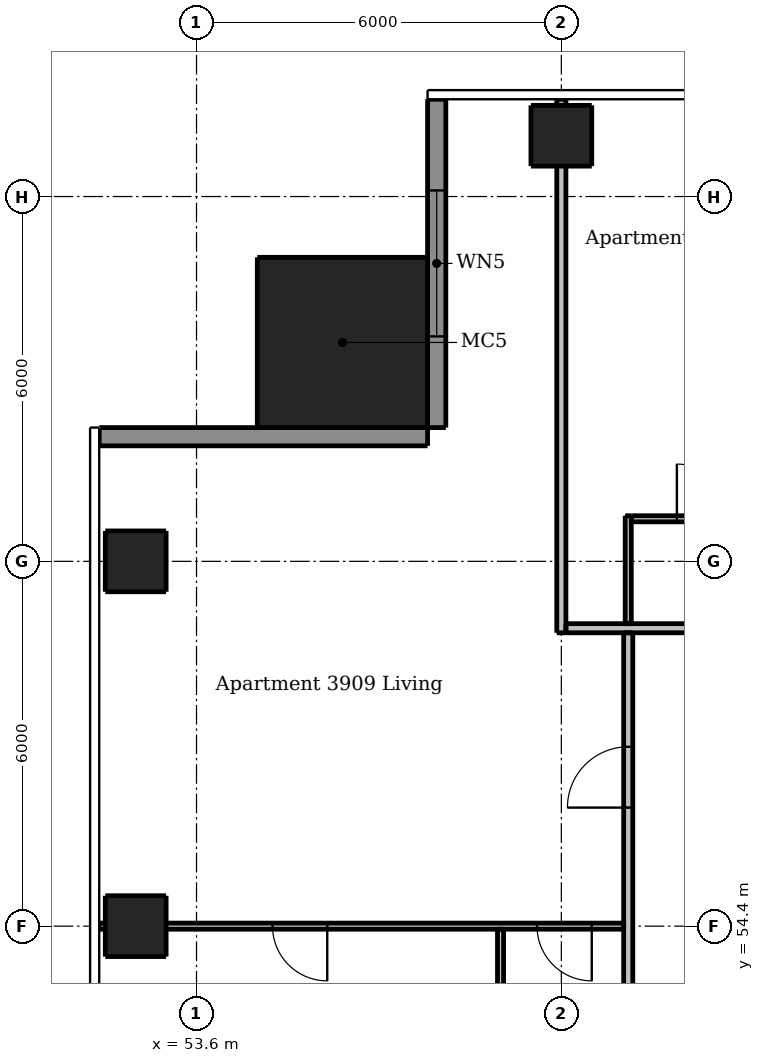
"""IFC4 building model, lengths in metres.
Left out: names, types, materials, properties, quantities, classifications, styles, units other than length and angle.
Written with IfcOpenShell. Run it as: python <this file> out.ifc"""

import sys

from ifc_helpers import new_model, si_unit, direction, frame, frame_2d, origin, origin_2d, place, context, subcontext, project, spatial, rectangle, extrude, element, fill, save


model = new_model("IFC4")
c1 = context("Model", 3, precision=1e-05, world=origin(), true_north=direction((0.0, 1.0)))
c2 = subcontext(c1, "Body", "Model", "MODEL_VIEW")
j1 = project(units=[si_unit("LENGTHUNIT", "METRE"), si_unit("PLANEANGLEUNIT", "RADIAN")], contexts=[c1])
p1 = place(None, origin())
s1 = spatial("IfcSite", under=j1, at=p1, CompositionType="ELEMENT")
p2 = place(p1, origin())
s2 = spatial("IfcBuilding", under=s1, at=p2, CompositionType="ELEMENT")
p3 = place(p2, frame((0.0, 0.0, 147.1)))
s3 = spatial("IfcBuildingStorey", under=s2, at=p3, CompositionType="ELEMENT", Elevation=147.1)
for number, where, z_axis, x_axis in (
    (1, (59.6, 67.4, 0.0), (0.0, 0.0, 1.0), (1.0, 0.0, 0.0)),
    (2, (52.6, 54.4, 0.0), (0.0, 0.0, 1.0), (1.0, 0.0, 0.0)),
    (3, (52.6, 60.4, 0.0), (0.0, 0.0, 1.0), (1.0, 0.0, 0.0)),
):
    element("IfcColumn", number, at=place(p3, frame(where, z_axis=z_axis, x_axis=x_axis)), inside=s3, PredefinedType="COLUMN", context=c2, shape_type="SweptSolid", body=[
        extrude(rectangle(XDim=1.0, YDim=1.0, at=origin_2d()), origin(), (0.0, 0.0, 1.0), 3.0),
    ])
p4 = place(p3, frame((56.0, 64.0, 0.0), z_axis=(0.0, 0.0, 1.0), x_axis=(1.0, 0.0, 0.0)))
e4 = element("IfcColumn", 4, at=p4, inside=s3, PredefinedType="COLUMN", context=c2, shape_type="SweptSolid", body=[
    extrude(rectangle(XDim=2.8, YDim=2.8, at=origin_2d()), origin(), (0.0, 0.0, 1.0), 3.3),
])
p5 = place(p3, frame((57.55, 68.0, 0.0), z_axis=(0.0, 0.0, 1.0), x_axis=(0.0, -1.0, 0.0)))
e5 = element("IfcWall", 5, at=p5, inside=s3, PredefinedType="SOLIDWALL", context=c2, shape_type="SweptSolid", body=[
    extrude(rectangle(XDim=5.4, YDim=0.3, at=frame_2d((2.7, 0.0))), origin(), (0.0, 0.0, 1.0), 3.0),
])
p6 = place(p5, frame((1.5, 0.0, 0.15)))
e6 = element("IfcOpeningElement", 6, at=p6, cuts=e5, PredefinedType="OPENING", context=c2, shape_type="SweptSolid", body=[
    extrude(rectangle(XDim=2.4, YDim=2.1, at=frame_2d((1.2, 1.05))), frame((0.0, 0.16, 0.0), z_axis=(0.0, -1.0, 0.0), x_axis=(1.0, 0.0, 0.0)), (0.0, 0.0, 1.0), 0.32),
])
p7 = place(p3, frame((57.4, 62.45, 0.0), z_axis=(0.0, 0.0, 1.0), x_axis=(-1.0, 0.0, 0.0)))
e7 = element("IfcWall", 7, at=p7, inside=s3, PredefinedType="SOLIDWALL", context=c2, shape_type="SweptSolid", body=[
    extrude(rectangle(XDim=5.4, YDim=0.3, at=frame_2d((2.7, 0.0))), origin(), (0.0, 0.0, 1.0), 3.0),
])
p8 = place(p3, frame((58.6, 54.35, 0.0), z_axis=(0.0, 0.0, 1.0), x_axis=(0.0, -1.0, 0.0)))
e8 = element("IfcWall", 8, at=p8, inside=s3, PredefinedType="PARTITIONING", context=c2, shape_type="SweptSolid", body=[
    extrude(rectangle(XDim=5.875, YDim=0.1, at=frame_2d((2.938, 0.0))), origin(), (0.0, 0.0, 1.0), 3.0),
])
p9 = place(p8, frame((3.75, 0.0, 0.0)))
e9 = element("IfcOpeningElement", 9, at=p9, cuts=e8, PredefinedType="OPENING", context=c2, shape_type="SweptSolid", body=[
    extrude(rectangle(XDim=0.8, YDim=2.1, at=frame_2d((0.4, 1.05))), frame((0.0, 0.06, 0.0), z_axis=(0.0, -1.0, 0.0), x_axis=(1.0, 0.0, 0.0)), (0.0, 0.0, 1.0), 0.12),
])
p10 = place(p3, frame((60.7, 59.375, 0.0), z_axis=(0.0, 0.0, 1.0), x_axis=(0.0, 1.0, 0.0)))
e10 = element("IfcWall", 10, at=p10, inside=s3, PredefinedType="PARTITIONING", context=c2, shape_type="SweptSolid", body=[
    extrude(rectangle(XDim=1.775, YDim=0.1, at=frame_2d((0.887, 0.0))), origin(), (0.0, 0.0, 1.0), 3.0),
])
p11 = place(p3, frame((60.75, 61.1, 0.0), z_axis=(0.0, 0.0, 1.0), x_axis=(1.0, 0.0, 0.0)))
e11 = element("IfcWall", 11, at=p11, inside=s3, PredefinedType="PARTITIONING", context=c2, shape_type="SweptSolid", body=[
    extrude(rectangle(XDim=16.775, YDim=0.1, at=frame_2d((8.387, 0.0))), origin(), (0.0, 0.0, 1.0), 3.0),
])
p12 = place(p11, frame((9.8, 0.0, 0.0)))
e12 = element("IfcOpeningElement", 12, at=p12, cuts=e11, PredefinedType="OPENING", context=c2, shape_type="SweptSolid", body=[
    extrude(rectangle(XDim=0.9, YDim=2.1, at=frame_2d((0.45, 1.05))), frame((0.0, 0.06, 0.0), z_axis=(0.0, -1.0, 0.0), x_axis=(1.0, 0.0, 0.0)), (0.0, 0.0, 1.0), 0.12),
])
p13 = place(p11, frame((14.9, 0.0, 0.0)))
e13 = element("IfcOpeningElement", 13, at=p13, cuts=e11, PredefinedType="OPENING", context=c2, shape_type="SweptSolid", body=[
    extrude(rectangle(XDim=0.9, YDim=2.1, at=frame_2d((0.45, 1.05))), frame((0.0, 0.06, 0.0), z_axis=(0.0, -1.0, 0.0), x_axis=(1.0, 0.0, 0.0)), (0.0, 0.0, 1.0), 0.12),
])
p14 = place(p11, frame((5.3, 0.0, 0.0)))
e14 = element("IfcOpeningElement", 14, at=p14, cuts=e11, PredefinedType="OPENING", context=c2, shape_type="SweptSolid", body=[
    extrude(rectangle(XDim=0.9, YDim=2.1, at=frame_2d((0.45, 1.05))), frame((0.0, 0.06, 0.0), z_axis=(0.0, -1.0, 0.0), x_axis=(1.0, 0.0, 0.0)), (0.0, 0.0, 1.0), 0.12),
])
p15 = place(p11, frame((0.75, 0.0, 0.0)))
e15 = element("IfcOpeningElement", 15, at=p15, cuts=e11, PredefinedType="OPENING", context=c2, shape_type="SweptSolid", body=[
    extrude(rectangle(XDim=0.9, YDim=2.1, at=frame_2d((0.45, 1.05))), frame((0.0, 0.06, 0.0), z_axis=(0.0, -1.0, 0.0), x_axis=(1.0, 0.0, 0.0)), (0.0, 0.0, 1.0), 0.12),
])
p16 = place(p11, frame((3.25, 0.0, 0.0)))
e16 = element("IfcOpeningElement", 16, at=p16, cuts=e11, PredefinedType="OPENING", context=c2, shape_type="SweptSolid", body=[
    extrude(rectangle(XDim=0.8, YDim=2.1, at=frame_2d((0.4, 1.05))), frame((0.0, 0.06, 0.0), z_axis=(0.0, -1.0, 0.0), x_axis=(1.0, 0.0, 0.0)), (0.0, 0.0, 1.0), 0.12),
])
p17 = place(p3, frame((60.625, 54.4, 0.0), z_axis=(0.0, 0.0, 1.0), x_axis=(-1.0, 0.0, 0.0)))
e17 = element("IfcWall", 17, at=p17, inside=s3, PredefinedType="PARTITIONING", context=c2, shape_type="SweptSolid", body=[
    extrude(rectangle(XDim=8.625, YDim=0.1, at=frame_2d((4.312, 0.0))), origin(), (0.0, 0.0, 1.0), 2.466),
])
p18 = place(p17, frame((0.525, 0.0, 0.0)))
e18 = element("IfcOpeningElement", 18, at=p18, cuts=e17, PredefinedType="OPENING", context=c2, shape_type="SweptSolid", body=[
    extrude(rectangle(XDim=0.9, YDim=2.1, at=frame_2d((0.45, 1.05))), frame((0.0, 0.06, 0.0), z_axis=(0.0, -1.0, 0.0), x_axis=(1.0, 0.0, 0.0)), (0.0, 0.0, 1.0), 0.12),
])
p19 = place(p17, frame((4.875, 0.0, 0.0)))
e19 = element("IfcOpeningElement", 19, at=p19, cuts=e17, PredefinedType="OPENING", context=c2, shape_type="SweptSolid", body=[
    extrude(rectangle(XDim=0.9, YDim=2.1, at=frame_2d((0.45, 1.05))), frame((0.0, 0.06, 0.0), z_axis=(0.0, -1.0, 0.0), x_axis=(1.0, 0.0, 0.0)), (0.0, 0.0, 1.0), 0.12),
])
p20 = place(p3, frame((59.6, 59.225, 0.0), z_axis=(0.0, 0.0, 1.0), x_axis=(0.0, 1.0, 0.0)))
e20 = element("IfcWall", 20, at=p20, inside=s3, PredefinedType="PARTITIONING", context=c2, shape_type="SweptSolid", body=[
    extrude(rectangle(XDim=8.775, YDim=0.15, at=frame_2d((4.387, 0.0))), origin(), (0.0, 0.0, 1.0), 2.46),
])
p21 = place(p3, frame((60.7, 30.325, 0.0), z_axis=(0.0, 0.0, 1.0), x_axis=(0.0, 1.0, 0.0)))
e21 = element("IfcWall", 21, at=p21, inside=s3, PredefinedType="PARTITIONING", context=c2, shape_type="SweptSolid", body=[
    extrude(rectangle(XDim=28.9, YDim=0.15, at=frame_2d((14.45, 0.0))), origin(), (0.0, 0.0, 1.0), 3.0),
])
p22 = place(p21, frame((9.225, 0.0, 0.0)))
e22 = element("IfcOpeningElement", 22, at=p22, cuts=e21, PredefinedType="OPENING", context=c2, shape_type="SweptSolid", body=[
    extrude(rectangle(XDim=1.0, YDim=2.1, at=frame_2d((0.5, 1.05))), frame((0.0, 0.085, 0.0), z_axis=(0.0, -1.0, 0.0), x_axis=(1.0, 0.0, 0.0)), (0.0, 0.0, 1.0), 0.17),
])
p23 = place(p21, frame((26.025, 0.0, 0.0)))
e23 = element("IfcOpeningElement", 23, at=p23, cuts=e21, PredefinedType="OPENING", context=c2, shape_type="SweptSolid", body=[
    extrude(rectangle(XDim=1.0, YDim=2.1, at=frame_2d((0.5, 1.05))), frame((0.0, 0.085, 0.0), z_axis=(0.0, -1.0, 0.0), x_axis=(1.0, 0.0, 0.0)), (0.0, 0.0, 1.0), 0.17),
])
p24 = place(p3, frame((59.675, 59.3, 0.0), z_axis=(0.0, 0.0, 1.0), x_axis=(1.0, 0.0, 0.0)))
e24 = element("IfcWall", 24, at=p24, inside=s3, PredefinedType="PARTITIONING", context=c2, shape_type="SweptSolid", body=[
    extrude(rectangle(XDim=28.55, YDim=0.15, at=frame_2d((14.275, 0.0))), origin(), (0.0, 0.0, 1.0), 3.0),
])
p25 = place(p24, frame((8.975, 0.0, 0.0)))
e25 = element("IfcOpeningElement", 25, at=p25, cuts=e24, PredefinedType="OPENING", context=c2, shape_type="SweptSolid", body=[
    extrude(rectangle(XDim=1.0, YDim=2.1, at=frame_2d((0.5, 1.05))), frame((0.0, 0.085, 0.0), z_axis=(0.0, -1.0, 0.0), x_axis=(1.0, 0.0, 0.0)), (0.0, 0.0, 1.0), 0.17),
])
p26 = place(p24, frame((25.775, 0.0, 0.0)))
e26 = element("IfcOpeningElement", 26, at=p26, cuts=e24, PredefinedType="OPENING", context=c2, shape_type="SweptSolid", body=[
    extrude(rectangle(XDim=1.0, YDim=2.1, at=frame_2d((0.5, 1.05))), frame((0.0, 0.085, 0.0), z_axis=(0.0, -1.0, 0.0), x_axis=(1.0, 0.0, 0.0)), (0.0, 0.0, 1.0), 0.17),
])
p27 = place(p6, origin())
e27 = element("IfcWindow", 27, at=p27, inside=s3, PartitioningType="DOUBLE_PANEL_VERTICAL", PredefinedType="WINDOW", context=c2, shape_type="SweptSolid", body=[
    extrude(rectangle(XDim=2.4, YDim=2.1, at=frame_2d((1.2, 1.05))), frame((0.0, 0.03, 0.0), z_axis=(0.0, -1.0, 0.0), x_axis=(1.0, 0.0, 0.0)), (0.0, 0.0, 1.0), 0.06),
])
fill(e6, e27)
p28 = place(p15, origin())
e28 = element("IfcDoor", 28, at=p28, inside=s3, OperationType="SINGLE_SWING_LEFT", PredefinedType="DOOR", context=c2, shape_type="SweptSolid", body=[
    extrude(rectangle(XDim=0.9, YDim=2.1, at=frame_2d((0.45, 1.05))), frame((0.0, 0.025, 0.0), z_axis=(0.0, -1.0, 0.0), x_axis=(1.0, 0.0, 0.0)), (0.0, 0.0, 1.0), 0.05),
])
fill(e15, e28)
p29 = place(p23, origin())
e29 = element("IfcDoor", 29, at=p29, inside=s3, OperationType="SINGLE_SWING_LEFT", PredefinedType="DOOR", context=c2, shape_type="SweptSolid", body=[
    extrude(rectangle(XDim=1.0, YDim=2.1, at=frame_2d((0.5, 1.05))), frame((0.0, 0.025, 0.0), z_axis=(0.0, -1.0, 0.0), x_axis=(1.0, 0.0, 0.0)), (0.0, 0.0, 1.0), 0.05),
])
fill(e23, e29)
p30 = place(p18, origin())
e30 = element("IfcDoor", 30, at=p30, inside=s3, OperationType="SINGLE_SWING_LEFT", PredefinedType="DOOR", context=c2, shape_type="SweptSolid", body=[
    extrude(rectangle(XDim=0.9, YDim=2.1, at=frame_2d((0.45, 1.05))), frame((0.0, 0.025, 0.0), z_axis=(0.0, -1.0, 0.0), x_axis=(1.0, 0.0, 0.0)), (0.0, 0.0, 1.0), 0.05),
])
fill(e18, e30)
p31 = place(p19, origin())
e31 = element("IfcDoor", 31, at=p31, inside=s3, OperationType="SINGLE_SWING_LEFT", PredefinedType="DOOR", context=c2, shape_type="SweptSolid", body=[
    extrude(rectangle(XDim=0.9, YDim=2.1, at=frame_2d((0.45, 1.05))), frame((0.0, 0.025, 0.0), z_axis=(0.0, -1.0, 0.0), x_axis=(1.0, 0.0, 0.0)), (0.0, 0.0, 1.0), 0.05),
])
fill(e19, e31)
save(model, sys.argv[1])
